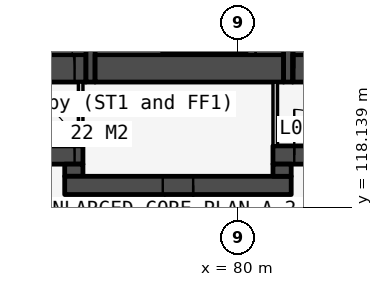
"""IFC4 building model, lengths in metres.
Left out: names, types, materials, properties, quantities, classifications, styles, units other than length and angle.
Written with IfcOpenShell. Run it as: python <this file> out.ifc"""

import sys

from ifc_helpers import new_model, si_unit, direction, frame, frame_2d, origin, place, context, subcontext, project, spatial, rectangle, extrude, element, fill, save


model = new_model("IFC4")
c1 = context("Model", 3, precision=1e-05, world=origin(), true_north=direction((0.0, 1.0)))
c2 = subcontext(c1, "Body", "Model", "MODEL_VIEW")
j1 = project(units=[si_unit("LENGTHUNIT", "METRE"), si_unit("PLANEANGLEUNIT", "RADIAN")], contexts=[c1])
p1 = place(None, origin())
s1 = spatial("IfcSite", under=j1, at=p1, CompositionType="ELEMENT")
p2 = place(p1, origin())
s2 = spatial("IfcBuilding", under=s1, at=p2, CompositionType="ELEMENT")
p3 = place(p2, origin())
s3 = spatial("IfcBuildingStorey", under=s2, at=p3, CompositionType="ELEMENT", Elevation=0.0)
p4 = place(p3, frame((66.0, 119.85, 0.0), z_axis=(0.0, 0.0, 1.0), x_axis=(1.0, 0.0, 0.0)))
e1 = element("IfcWall", 1, at=p4, inside=s3, PredefinedType="SOLIDWALL", context=c2, shape_type="SweptSolid", body=[
    extrude(rectangle(XDim=8.9, YDim=0.6, at=frame_2d((4.45, 0.0))), origin(), (0.0, 0.0, 1.0), 7.2),
])
p5 = place(p4, frame((6.825, 0.0, 0.0)))
e2 = element("IfcOpeningElement", 2, at=p5, cuts=e1, PredefinedType="OPENING", context=c2, shape_type="SweptSolid", body=[
    extrude(rectangle(XDim=1.8, YDim=2.1, at=frame_2d((0.9, 1.05))), frame((0.0, 0.31, 0.0), z_axis=(0.0, -1.0, 0.0), x_axis=(1.0, 0.0, 0.0)), (0.0, 0.0, 1.0), 0.62),
])
p6 = place(p4, frame((4.425, 0.0, 0.0)))
e3 = element("IfcOpeningElement", 3, at=p6, cuts=e1, PredefinedType="OPENING", context=c2, shape_type="SweptSolid", body=[
    extrude(rectangle(XDim=1.0, YDim=2.1, at=frame_2d((0.5, 1.05))), frame((0.0, 0.31, 0.0), z_axis=(0.0, -1.0, 0.0), x_axis=(1.0, 0.0, 0.0)), (0.0, 0.0, 1.0), 0.62),
])
p7 = place(p3, frame((72.45, 122.7, 0.0), z_axis=(0.0, 0.0, 1.0), x_axis=(1.0, 0.0, 0.0)))
e4 = element("IfcWall", 4, at=p7, inside=s3, PredefinedType="SOLIDWALL", context=c2, shape_type="SweptSolid", body=[
    extrude(rectangle(XDim=2.55, YDim=0.9, at=frame_2d((1.275, 0.0))), origin(), (0.0, 0.0, 1.0), 7.2),
])
p8 = place(p7, frame((0.375, 0.0, 0.0)))
e5 = element("IfcOpeningElement", 5, at=p8, cuts=e4, PredefinedType="OPENING", context=c2, shape_type="SweptSolid", body=[
    extrude(rectangle(XDim=1.8, YDim=2.1, at=frame_2d((0.9, 1.05))), frame((0.0, 0.46, 0.0), z_axis=(0.0, -1.0, 0.0), x_axis=(1.0, 0.0, 0.0)), (0.0, 0.0, 1.0), 0.92),
])
p9 = place(p3, frame((74.3, 119.35, 0.0), z_axis=(0.0, 0.0, 1.0), x_axis=(1.0, 0.0, 0.0)))
e6 = element("IfcWall", 6, at=p9, inside=s3, PredefinedType="SOLIDWALL", context=c2, shape_type="SweptSolid", body=[
    extrude(rectangle(XDim=0.6, YDim=0.4, at=frame_2d((0.3, 0.0))), origin(), (0.0, 0.0, 1.0), 7.2),
])
p10 = place(p3, frame((74.3, 118.85, 0.0), z_axis=(0.0, 0.0, 1.0), x_axis=(1.0, 0.0, 0.0)))
e7 = element("IfcWall", 7, at=p10, inside=s3, PredefinedType="SOLIDWALL", context=c2, shape_type="SweptSolid", body=[
    extrude(rectangle(XDim=7.45, YDim=0.6, at=frame_2d((3.725, 0.0))), origin(), (0.0, 0.0, 1.0), 7.2),
])
p11 = place(p10, frame((3.225, 0.0, 0.0)))
e8 = element("IfcOpeningElement", 8, at=p11, cuts=e7, PredefinedType="OPENING", context=c2, shape_type="SweptSolid", body=[
    extrude(rectangle(XDim=1.0, YDim=2.1, at=frame_2d((0.5, 1.05))), frame((0.0, 0.31, 0.0), z_axis=(0.0, -1.0, 0.0), x_axis=(1.0, 0.0, 0.0)), (0.0, 0.0, 1.0), 0.62),
])
p12 = place(p3, frame((74.825, 122.25, 0.0), z_axis=(0.0, 0.0, 1.0), x_axis=(0.0, -1.0, 0.0)))
e9 = element("IfcWall", 9, at=p12, inside=s3, PredefinedType="PARTITIONING", context=c2, shape_type="SweptSolid", body=[
    extrude(rectangle(XDim=2.1, YDim=0.15, at=frame_2d((1.05, 0.0))), origin(), (0.0, 0.0, 1.0), 7.2),
])
p13 = place(p3, frame((75.15, 133.95, 0.0), z_axis=(0.0, 0.0, 1.0), x_axis=(0.0, -1.0, 0.0)))
e10 = element("IfcWall", 10, at=p13, inside=s3, PredefinedType="SOLIDWALL", context=c2, shape_type="SweptSolid", body=[
    extrude(rectangle(XDim=11.7, YDim=0.3, at=frame_2d((5.85, 0.0))), origin(), (0.0, 0.0, 1.0), 7.2),
])
p14 = place(p3, frame((75.3, 122.7, 0.0), z_axis=(0.0, 0.0, 1.0), x_axis=(1.0, 0.0, 0.0)))
e11 = element("IfcWall", 11, at=p14, inside=s3, PredefinedType="SOLIDWALL", context=c2, shape_type="SweptSolid", body=[
    extrude(rectangle(XDim=6.2, YDim=0.9, at=frame_2d((3.1, 0.0))), origin(), (0.0, 0.0, 1.0), 7.2),
])
p15 = place(p3, frame((81.225, 122.25, 0.0), z_axis=(0.0, 0.0, 1.0), x_axis=(0.0, -1.0, 0.0)))
e12 = element("IfcWall", 12, at=p15, inside=s3, PredefinedType="PARTITIONING", context=c2, shape_type="SweptSolid", body=[
    extrude(rectangle(XDim=2.1, YDim=0.15, at=frame_2d((1.05, 0.0))), origin(), (0.0, 0.0, 1.0), 7.2),
])
p16 = place(p3, frame((81.15, 119.85, 0.0), z_axis=(0.0, 0.0, 1.0), x_axis=(1.0, 0.0, 0.0)))
e13 = element("IfcWall", 13, at=p16, inside=s3, PredefinedType="SOLIDWALL", context=c2, shape_type="SweptSolid", body=[
    extrude(rectangle(XDim=12.85, YDim=0.6, at=frame_2d((6.425, 0.0))), origin(), (0.0, 0.0, 1.0), 7.2),
])
p17 = place(p16, frame((0.7, 0.0, 0.0)))
e14 = element("IfcOpeningElement", 14, at=p17, cuts=e13, PredefinedType="OPENING", context=c2, shape_type="SweptSolid", body=[
    extrude(rectangle(XDim=1.5, YDim=2.1, at=frame_2d((0.75, 1.05))), frame((0.0, 0.31, 0.0), z_axis=(0.0, -1.0, 0.0), x_axis=(1.0, 0.0, 0.0)), (0.0, 0.0, 1.0), 0.62),
])
p18 = place(p16, frame((4.225, 0.0, 0.0)))
e15 = element("IfcOpeningElement", 15, at=p18, cuts=e13, PredefinedType="OPENING", context=c2, shape_type="SweptSolid", body=[
    extrude(rectangle(XDim=1.8, YDim=2.1, at=frame_2d((0.9, 1.05))), frame((0.0, 0.31, 0.0), z_axis=(0.0, -1.0, 0.0), x_axis=(1.0, 0.0, 0.0)), (0.0, 0.0, 1.0), 0.62),
])
p19 = place(p16, frame((7.425, 0.0, 0.0)))
e16 = element("IfcOpeningElement", 16, at=p19, cuts=e13, PredefinedType="OPENING", context=c2, shape_type="SweptSolid", body=[
    extrude(rectangle(XDim=1.0, YDim=2.1, at=frame_2d((0.5, 1.05))), frame((0.0, 0.31, 0.0), z_axis=(0.0, -1.0, 0.0), x_axis=(1.0, 0.0, 0.0)), (0.0, 0.0, 1.0), 0.62),
])
p20 = place(p3, frame((81.15, 119.35, 0.0), z_axis=(0.0, 0.0, 1.0), x_axis=(1.0, 0.0, 0.0)))
e17 = element("IfcWall", 17, at=p20, inside=s3, PredefinedType="SOLIDWALL", context=c2, shape_type="SweptSolid", body=[
    extrude(rectangle(XDim=0.6, YDim=0.4, at=frame_2d((0.3, 0.0))), origin(), (0.0, 0.0, 1.0), 7.2),
])
p21 = place(p3, frame((81.65, 125.7, 0.0), z_axis=(0.0, 0.0, 1.0), x_axis=(0.0, -1.0, 0.0)))
e18 = element("IfcWall", 18, at=p21, inside=s3, PredefinedType="SOLIDWALL", context=c2, shape_type="SweptSolid", body=[
    extrude(rectangle(XDim=3.45, YDim=0.3, at=frame_2d((1.725, 0.0))), origin(), (0.0, 0.0, 1.0), 7.2),
])
p22 = place(p21, frame((0.75, 0.0, 0.0)))
e19 = element("IfcOpeningElement", 19, at=p22, cuts=e18, PredefinedType="OPENING", context=c2, shape_type="SweptSolid", body=[
    extrude(rectangle(XDim=1.0, YDim=2.1, at=frame_2d((0.5, 1.05))), frame((0.0, 0.16, 0.0), z_axis=(0.0, -1.0, 0.0), x_axis=(1.0, 0.0, 0.0)), (0.0, 0.0, 1.0), 0.32),
])
p23 = place(p3, frame((81.8, 122.7, 0.0), z_axis=(0.0, 0.0, 1.0), x_axis=(1.0, 0.0, 0.0)))
e20 = element("IfcWall", 20, at=p23, inside=s3, PredefinedType="SOLIDWALL", context=c2, shape_type="SweptSolid", body=[
    extrude(rectangle(XDim=2.9, YDim=0.9, at=frame_2d((1.45, 0.0))), origin(), (0.0, 0.0, 1.0), 7.2),
])
p24 = place(p23, frame((0.05, 0.0, 0.0)))
e21 = element("IfcOpeningElement", 21, at=p24, cuts=e20, PredefinedType="OPENING", context=c2, shape_type="SweptSolid", body=[
    extrude(rectangle(XDim=1.5, YDim=2.1, at=frame_2d((0.75, 1.05))), frame((0.0, 0.46, 0.0), z_axis=(0.0, -1.0, 0.0), x_axis=(1.0, 0.0, 0.0)), (0.0, 0.0, 1.0), 0.92),
])
p25 = place(p8, origin())
e22 = element("IfcDoor", 22, at=p25, inside=s3, OperationType="DOUBLE_DOOR_DOUBLE_SWING", PredefinedType="DOOR", context=c2, shape_type="SweptSolid", body=[
    extrude(rectangle(XDim=1.8, YDim=2.1, at=frame_2d((0.9, 1.05))), frame((0.0, 0.025, 0.0), z_axis=(0.0, -1.0, 0.0), x_axis=(1.0, 0.0, 0.0)), (0.0, 0.0, 1.0), 0.05),
])
fill(e5, e22)
p26 = place(p24, origin())
e23 = element("IfcDoor", 23, at=p26, inside=s3, OperationType="DOUBLE_DOOR_DOUBLE_SWING", PredefinedType="DOOR", context=c2, shape_type="SweptSolid", body=[
    extrude(rectangle(XDim=1.5, YDim=2.1, at=frame_2d((0.75, 1.05))), frame((0.0, 0.025, 0.0), z_axis=(0.0, -1.0, 0.0), x_axis=(1.0, 0.0, 0.0)), (0.0, 0.0, 1.0), 0.05),
])
fill(e21, e23)
p27 = place(p5, origin())
e24 = element("IfcDoor", 24, at=p27, inside=s3, OperationType="DOUBLE_DOOR_DOUBLE_SWING", PredefinedType="DOOR", context=c2, shape_type="SweptSolid", body=[
    extrude(rectangle(XDim=1.8, YDim=2.1, at=frame_2d((0.9, 1.05))), frame((0.0, 0.025, 0.0), z_axis=(0.0, -1.0, 0.0), x_axis=(1.0, 0.0, 0.0)), (0.0, 0.0, 1.0), 0.05),
])
fill(e2, e24)
p28 = place(p17, origin())
e25 = element("IfcDoor", 25, at=p28, inside=s3, OperationType="DOUBLE_DOOR_DOUBLE_SWING", PredefinedType="DOOR", context=c2, shape_type="SweptSolid", body=[
    extrude(rectangle(XDim=1.5, YDim=2.1, at=frame_2d((0.75, 1.05))), frame((0.0, 0.025, 0.0), z_axis=(0.0, -1.0, 0.0), x_axis=(1.0, 0.0, 0.0)), (0.0, 0.0, 1.0), 0.05),
])
fill(e14, e25)
p29 = place(p11, origin())
e26 = element("IfcDoor", 26, at=p29, inside=s3, OperationType="SINGLE_SWING_RIGHT", PredefinedType="DOOR", context=c2, shape_type="SweptSolid", body=[
    extrude(rectangle(XDim=1.0, YDim=2.1, at=frame_2d((0.5, 1.05))), frame((0.0, 0.025, 0.0), z_axis=(0.0, -1.0, 0.0), x_axis=(1.0, 0.0, 0.0)), (0.0, 0.0, 1.0), 0.05),
])
fill(e8, e26)
save(model, sys.argv[1])
